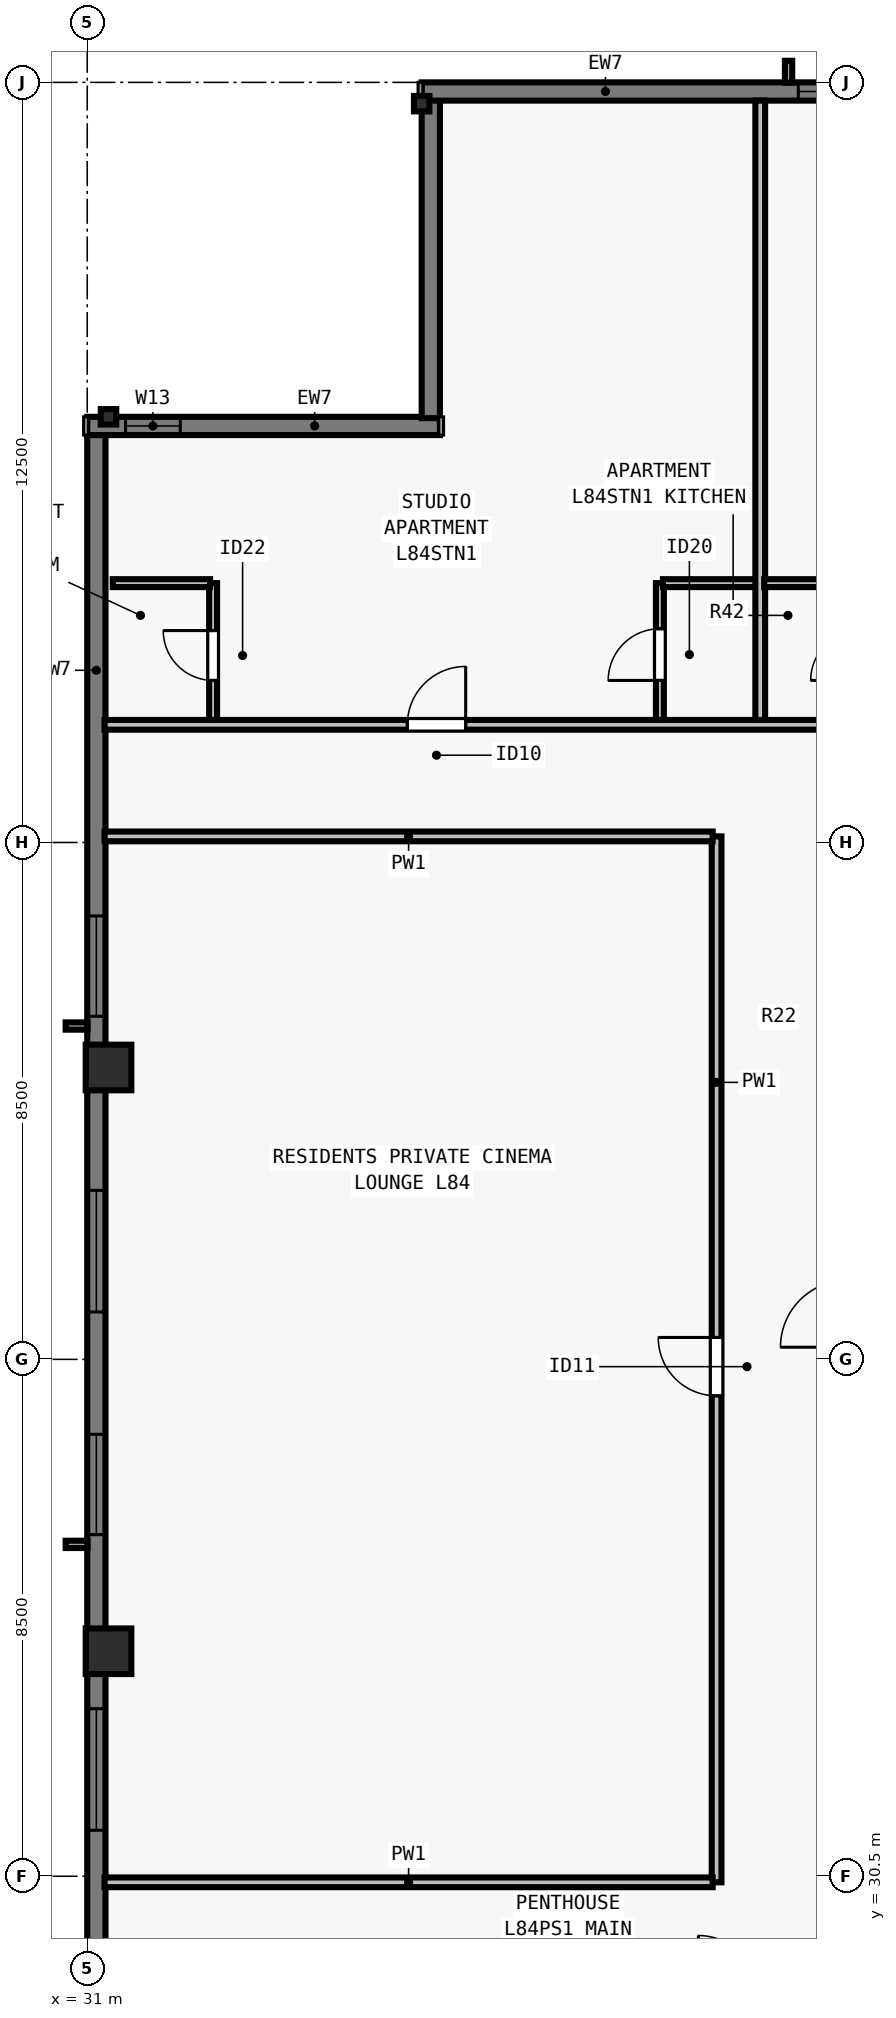
"""IFC4 building model, lengths in metres.
Left out: names, types, materials, properties, quantities, classifications, styles, units other than length and angle.
Written with IfcOpenShell. Run it as: python <this file> out.ifc"""

import sys

from ifc_helpers import new_model, si_unit, direction, frame, frame_2d, origin, origin_2d, place, context, subcontext, project, spatial, rectangle, i_section, extrude, element, fill, save


model = new_model("IFC4")
c1 = context("Model", 3, precision=1e-05, world=origin(), true_north=direction((0.0, 1.0)))
c2 = subcontext(c1, "Body", "Model", "MODEL_VIEW")
j1 = project(units=[si_unit("LENGTHUNIT", "METRE"), si_unit("PLANEANGLEUNIT", "RADIAN")], contexts=[c1])
p1 = place(None, origin())
s1 = spatial("IfcSite", under=j1, at=p1, CompositionType="ELEMENT")
p2 = place(p1, origin())
s2 = spatial("IfcBuilding", under=s1, at=p2, CompositionType="ELEMENT")
p3 = place(p2, frame((0.0, 0.0, 305.0)))
s3 = spatial("IfcBuildingStorey", under=s2, at=p3, CompositionType="ELEMENT", Elevation=305.0)
for number, where, z_axis, x_axis in (
    (1, (36.5, 59.65, 0.0), (0.0, 0.0, 1.0), (1.0, 0.0, 0.0)),
    (2, (31.35, 54.5, 0.0), (0.0, 0.0, 1.0), (0.0, 1.0, 0.0)),
):
    element("IfcColumn", number, at=place(p3, frame(where, z_axis=z_axis, x_axis=x_axis)), inside=s3, PredefinedType="COLUMN", context=c2, shape_type="SweptSolid", body=[
        extrude(i_section(OverallWidth=0.254, OverallDepth=0.254, WebThickness=0.009, FlangeThickness=0.014, FilletRadius=0.013, at=origin_2d()), origin(), (0.0, 0.0, 1.0), 3.5),
    ])
for number, where, z_axis, x_axis in (
    (3, (31.35, 43.8, 0.0), (0.0, 0.0, 1.0), (0.0, 1.0, 0.0)),
    (4, (31.35, 34.2, 0.0), (0.0, 0.0, 1.0), (0.0, 1.0, 0.0)),
):
    element("IfcColumn", number, at=place(p3, frame(where, z_axis=z_axis, x_axis=x_axis)), inside=s3, PredefinedType="COLUMN", context=c2, shape_type="SweptSolid", body=[
        extrude(rectangle(XDim=0.75, YDim=0.75, at=origin_2d()), origin(), (0.0, 0.0, 1.0), 3.5),
    ])
p4 = place(p3, frame((31.15, 23.5, 0.0), z_axis=(0.0, 0.0, 1.0), x_axis=(0.0, 1.0, 0.0)))
e5 = element("IfcWall", 5, at=p4, inside=s3, PredefinedType="SOLIDWALL", context=c2, shape_type="SweptSolid", body=[
    extrude(rectangle(XDim=30.722, YDim=0.3, at=frame_2d((15.361, 0.0))), origin(), (0.0, 0.0, 1.0), 3.29),
])
p5 = place(p4, frame((7.756, 0.0, 0.8)))
e6 = element("IfcOpeningElement", 6, at=p5, cuts=e5, PredefinedType="OPENING", context=c2, shape_type="SweptSolid", body=[
    extrude(rectangle(XDim=2.0, YDim=1.758, at=frame_2d((1.0, 0.879))), frame((0.0, 0.16, 0.0), z_axis=(0.0, -1.0, 0.0), x_axis=(1.0, 0.0, 0.0)), (0.0, 0.0, 1.0), 0.32),
])
p6 = place(p4, frame((12.617, 0.0, 0.8)))
e7 = element("IfcOpeningElement", 7, at=p6, cuts=e5, PredefinedType="OPENING", context=c2, shape_type="SweptSolid", body=[
    extrude(rectangle(XDim=1.65, YDim=1.758, at=frame_2d((0.825, 0.879))), frame((0.0, 0.16, 0.0), z_axis=(0.0, -1.0, 0.0), x_axis=(1.0, 0.0, 0.0)), (0.0, 0.0, 1.0), 0.32),
])
p7 = place(p4, frame((16.28, 0.0, 0.8)))
e8 = element("IfcOpeningElement", 8, at=p7, cuts=e5, PredefinedType="OPENING", context=c2, shape_type="SweptSolid", body=[
    extrude(rectangle(XDim=2.0, YDim=1.758, at=frame_2d((1.0, 0.879))), frame((0.0, 0.16, 0.0), z_axis=(0.0, -1.0, 0.0), x_axis=(1.0, 0.0, 0.0)), (0.0, 0.0, 1.0), 0.32),
])
p8 = place(p4, frame((21.142, 0.0, 0.8)))
e9 = element("IfcOpeningElement", 9, at=p8, cuts=e5, PredefinedType="OPENING", context=c2, shape_type="SweptSolid", body=[
    extrude(rectangle(XDim=1.65, YDim=1.758, at=frame_2d((0.825, 0.879))), frame((0.0, 0.16, 0.0), z_axis=(0.0, -1.0, 0.0), x_axis=(1.0, 0.0, 0.0)), (0.0, 0.0, 1.0), 0.32),
])
p9 = place(p3, frame((31.0, 54.35, 0.0), z_axis=(0.0, 0.0, 1.0), x_axis=(1.0, 0.0, 0.0)))
e10 = element("IfcWall", 10, at=p9, inside=s3, PredefinedType="SOLIDWALL", context=c2, shape_type="SweptSolid", body=[
    extrude(rectangle(XDim=5.8, YDim=0.3, at=frame_2d((2.9, 0.0))), origin(), (0.0, 0.0, 1.0), 3.29),
])
p10 = place(p9, frame((0.63, 0.0, 0.8)))
e11 = element("IfcOpeningElement", 11, at=p10, cuts=e10, PredefinedType="OPENING", context=c2, shape_type="SweptSolid", body=[
    extrude(rectangle(XDim=0.9, YDim=1.75, at=frame_2d((0.45, 0.875))), frame((0.0, 0.16, 0.0), z_axis=(0.0, -1.0, 0.0), x_axis=(1.0, 0.0, 0.0)), (0.0, 0.0, 1.0), 0.32),
])
p11 = place(p3, frame((36.65, 54.478, 0.0), z_axis=(0.0, 0.0, 1.0), x_axis=(0.0, 1.0, 0.0)))
e12 = element("IfcWall", 12, at=p11, inside=s3, PredefinedType="SOLIDWALL", context=c2, shape_type="SweptSolid", body=[
    extrude(rectangle(XDim=5.244, YDim=0.3, at=frame_2d((2.622, 0.0))), origin(), (0.0, 0.0, 1.0), 3.29),
])
p12 = place(p3, frame((36.5, 59.85, 0.0), z_axis=(0.0, 0.0, 1.0), x_axis=(1.0, 0.0, 0.0)))
e13 = element("IfcWall", 13, at=p12, inside=s3, PredefinedType="SOLIDWALL", context=c2, shape_type="SweptSolid", body=[
    extrude(rectangle(XDim=30.722, YDim=0.3, at=frame_2d((15.361, 0.0))), origin(), (0.0, 0.0, 1.0), 3.29),
])
p13 = place(p12, frame((6.194, 0.0, 0.8)))
e14 = element("IfcOpeningElement", 14, at=p13, cuts=e13, PredefinedType="OPENING", context=c2, shape_type="SweptSolid", body=[
    extrude(rectangle(XDim=1.65, YDim=1.758, at=frame_2d((0.825, 0.879))), frame((0.0, 0.16, 0.0), z_axis=(0.0, -1.0, 0.0), x_axis=(1.0, 0.0, 0.0)), (0.0, 0.0, 1.0), 0.32),
])
p14 = place(p12, frame((12.617, 0.0, 0.8)))
e15 = element("IfcOpeningElement", 15, at=p14, cuts=e13, PredefinedType="OPENING", context=c2, shape_type="SweptSolid", body=[
    extrude(rectangle(XDim=1.65, YDim=1.758, at=frame_2d((0.825, 0.879))), frame((0.0, 0.16, 0.0), z_axis=(0.0, -1.0, 0.0), x_axis=(1.0, 0.0, 0.0)), (0.0, 0.0, 1.0), 0.32),
])
p15 = place(p12, frame((16.28, 0.0, 0.8)))
e16 = element("IfcOpeningElement", 16, at=p15, cuts=e13, PredefinedType="OPENING", context=c2, shape_type="SweptSolid", body=[
    extrude(rectangle(XDim=2.0, YDim=1.758, at=frame_2d((1.0, 0.879))), frame((0.0, 0.16, 0.0), z_axis=(0.0, -1.0, 0.0), x_axis=(1.0, 0.0, 0.0)), (0.0, 0.0, 1.0), 0.32),
])
p16 = place(p12, frame((21.142, 0.0, 0.8)))
e17 = element("IfcOpeningElement", 17, at=p16, cuts=e13, PredefinedType="OPENING", context=c2, shape_type="SweptSolid", body=[
    extrude(rectangle(XDim=1.65, YDim=1.758, at=frame_2d((0.825, 0.879))), frame((0.0, 0.16, 0.0), z_axis=(0.0, -1.0, 0.0), x_axis=(1.0, 0.0, 0.0)), (0.0, 0.0, 1.0), 0.32),
])
p17 = place(p12, frame((23.503, 0.0, 0.8)))
e18 = element("IfcOpeningElement", 18, at=p17, cuts=e13, PredefinedType="OPENING", context=c2, shape_type="SweptSolid", body=[
    extrude(rectangle(XDim=2.0, YDim=1.758, at=frame_2d((1.0, 0.879))), frame((0.0, 0.16, 0.0), z_axis=(0.0, -1.0, 0.0), x_axis=(1.0, 0.0, 0.0)), (0.0, 0.0, 1.0), 0.32),
])
p18 = place(p12, frame((26.55, 0.0, 0.8)))
e19 = element("IfcOpeningElement", 19, at=p18, cuts=e13, PredefinedType="OPENING", context=c2, shape_type="SweptSolid", body=[
    extrude(rectangle(XDim=0.9, YDim=1.75, at=frame_2d((0.45, 0.875))), frame((0.0, 0.16, 0.0), z_axis=(0.0, -1.0, 0.0), x_axis=(1.0, 0.0, 0.0)), (0.0, 0.0, 1.0), 0.32),
])
p19 = place(p3, frame((31.285, 49.435, 0.0), z_axis=(0.0, 0.0, 1.0), x_axis=(1.0, 0.0, 0.0)))
e20 = element("IfcWall", 20, at=p19, inside=s3, PredefinedType="PARTITIONING", context=c2, shape_type="SweptSolid", body=[
    extrude(rectangle(XDim=41.43, YDim=0.16, at=frame_2d((20.715, 0.0))), origin(), (0.0, 0.0, 1.0), 3.009),
])
p20 = place(p19, frame((4.979, 0.0, 0.0)))
e21 = element("IfcOpeningElement", 21, at=p20, cuts=e20, PredefinedType="OPENING", context=c2, shape_type="SweptSolid", body=[
    extrude(rectangle(XDim=0.96, YDim=2.18, at=frame_2d((0.48, 1.09))), frame((0.0, 0.09, 0.0), z_axis=(0.0, -1.0, 0.0), x_axis=(1.0, 0.0, 0.0)), (0.0, 0.0, 1.0), 0.18),
])
p21 = place(p19, frame((15.145, 0.0, 0.0)))
e22 = element("IfcOpeningElement", 22, at=p21, cuts=e20, PredefinedType="OPENING", context=c2, shape_type="SweptSolid", body=[
    extrude(rectangle(XDim=0.96, YDim=2.18, at=frame_2d((0.48, 1.09))), frame((0.0, 0.09, 0.0), z_axis=(0.0, -1.0, 0.0), x_axis=(1.0, 0.0, 0.0)), (0.0, 0.0, 1.0), 0.18),
])
p22 = place(p19, frame((25.435, 0.0, 0.0)))
e23 = element("IfcOpeningElement", 23, at=p22, cuts=e20, PredefinedType="OPENING", context=c2, shape_type="SweptSolid", body=[
    extrude(rectangle(XDim=0.96, YDim=2.18, at=frame_2d((0.48, 1.09))), frame((0.0, 0.09, 0.0), z_axis=(0.0, -1.0, 0.0), x_axis=(1.0, 0.0, 0.0)), (0.0, 0.0, 1.0), 0.18),
])
p23 = place(p19, frame((35.849, 0.0, 0.0)))
e24 = element("IfcOpeningElement", 24, at=p23, cuts=e20, PredefinedType="OPENING", context=c2, shape_type="SweptSolid", body=[
    extrude(rectangle(XDim=0.96, YDim=2.18, at=frame_2d((0.48, 1.09))), frame((0.0, 0.09, 0.0), z_axis=(0.0, -1.0, 0.0), x_axis=(1.0, 0.0, 0.0)), (0.0, 0.0, 1.0), 0.18),
])
p24 = place(p3, frame((41.35, 30.4, 0.0), z_axis=(0.0, 0.0, 1.0), x_axis=(0.0, 1.0, 0.0)))
e25 = element("IfcWall", 25, at=p24, inside=s3, PredefinedType="PARTITIONING", context=c2, shape_type="SweptSolid", body=[
    extrude(rectangle(XDim=17.2, YDim=0.16, at=frame_2d((8.6, 0.0))), origin(), (0.0, 0.0, 1.0), 3.009),
])
p25 = place(p24, frame((8.0, 0.0, 0.0)))
e26 = element("IfcOpeningElement", 26, at=p25, cuts=e25, PredefinedType="OPENING", context=c2, shape_type="SweptSolid", body=[
    extrude(rectangle(XDim=0.96, YDim=2.12, at=frame_2d((0.48, 1.06))), frame((0.0, 0.09, 0.0), z_axis=(0.0, -1.0, 0.0), x_axis=(1.0, 0.0, 0.0)), (0.0, 0.0, 1.0), 0.18),
])
for number, where, z_axis, x_axis in (
    (27, (31.285, 30.4, 0.0), (0.0, 0.0, 1.0), (1.0, 0.0, 0.0)),
    (28, (31.285, 47.6, 0.0), (0.0, 0.0, 1.0), (1.0, 0.0, 0.0)),
):
    element("IfcWall", number, at=place(p3, frame(where, z_axis=z_axis, x_axis=x_axis)), inside=s3, PredefinedType="PARTITIONING", context=c2, shape_type="SweptSolid", body=[
        extrude(rectangle(XDim=10.0, YDim=0.16, at=frame_2d((5.0, 0.0))), origin(), (0.0, 0.0, 1.0), 3.29),
    ])
p26 = place(p3, frame((33.07, 49.515, 0.0), z_axis=(0.0, 0.0, 1.0), x_axis=(0.0, 1.0, 0.0)))
e29 = element("IfcWall", 29, at=p26, inside=s3, PredefinedType="PLUMBINGWALL", context=c2, shape_type="SweptSolid", body=[
    extrude(rectangle(XDim=2.25, YDim=0.13, at=frame_2d((1.125, 0.0))), origin(), (0.0, 0.0, 1.0), 3.29),
])
p27 = place(p26, frame((0.65, 0.0, 0.0)))
e30 = element("IfcOpeningElement", 30, at=p27, cuts=e29, PredefinedType="OPENING", context=c2, shape_type="SweptSolid", body=[
    extrude(rectangle(XDim=0.82, YDim=2.1, at=frame_2d((0.41, 1.05))), frame((0.0, 0.075, 0.0), z_axis=(0.0, -1.0, 0.0), x_axis=(1.0, 0.0, 0.0)), (0.0, 0.0, 1.0), 0.15),
])
p28 = place(p3, frame((31.42, 51.765, 0.0), z_axis=(0.0, 0.0, 1.0), x_axis=(1.0, 0.0, 0.0)))
e31 = element("IfcWall", 31, at=p28, inside=s3, PredefinedType="PLUMBINGWALL", context=c2, shape_type="SweptSolid", body=[
    extrude(rectangle(XDim=1.6, YDim=0.13, at=frame_2d((0.8, 0.0))), origin(), (0.0, 0.0, 1.0), 3.29),
])
p29 = place(p3, frame((40.417, 49.515, 0.0), z_axis=(0.0, 0.0, 1.0), x_axis=(0.0, 1.0, 0.0)))
e32 = element("IfcWall", 32, at=p29, inside=s3, PredefinedType="PLUMBINGWALL", context=c2, shape_type="SweptSolid", body=[
    extrude(rectangle(XDim=2.25, YDim=0.13, at=frame_2d((1.125, 0.0))), origin(), (0.0, 0.0, 1.0), 3.29),
])
p30 = place(p29, frame((0.65, 0.0, 0.0)))
e33 = element("IfcOpeningElement", 33, at=p30, cuts=e32, PredefinedType="OPENING", context=c2, shape_type="SweptSolid", body=[
    extrude(rectangle(XDim=0.85, YDim=2.1, at=frame_2d((0.425, 1.05))), frame((0.0, 0.075, 0.0), z_axis=(0.0, -1.0, 0.0), x_axis=(1.0, 0.0, 0.0)), (0.0, 0.0, 1.0), 0.15),
])
p31 = place(p3, frame((40.468, 51.765, 0.0), z_axis=(0.0, 0.0, 1.0), x_axis=(1.0, 0.0, 0.0)))
e34 = element("IfcWall", 34, at=p31, inside=s3, PredefinedType="PLUMBINGWALL", context=c2, shape_type="SweptSolid", body=[
    extrude(rectangle(XDim=1.6, YDim=0.13, at=frame_2d((0.8, 0.0))), origin(), (0.0, 0.0, 1.0), 3.29),
])
p32 = place(p3, frame((42.067, 49.515, 0.0), z_axis=(0.0, 0.0, 1.0), x_axis=(0.0, 1.0, 0.0)))
e35 = element("IfcWall", 35, at=p32, inside=s3, PredefinedType="PARTITIONING", context=c2, shape_type="SweptSolid", body=[
    extrude(rectangle(XDim=10.185, YDim=0.16, at=frame_2d((5.093, 0.0))), origin(), (0.0, 0.0, 1.0), 2.653),
])
p33 = place(p3, frame((42.133, 51.765, 0.0), z_axis=(0.0, 0.0, 1.0), x_axis=(1.0, 0.0, 0.0)))
e36 = element("IfcWall", 36, at=p33, inside=s3, PredefinedType="PLUMBINGWALL", context=c2, shape_type="SweptSolid", body=[
    extrude(rectangle(XDim=1.535, YDim=0.13, at=frame_2d((0.768, 0.0))), origin(), (0.0, 0.0, 1.0), 3.29),
])
p34 = place(p5, origin())
e37 = element("IfcWindow", 37, at=p34, inside=s3, PartitioningType="SINGLE_PANEL", PredefinedType="WINDOW", context=c2, shape_type="SweptSolid", body=[
    extrude(rectangle(XDim=2.0, YDim=1.758, at=frame_2d((1.0, 0.879))), frame((0.0, -0.05, 0.0), z_axis=(0.0, -1.0, 0.0), x_axis=(1.0, 0.0, 0.0)), (0.0, 0.0, 1.0), 0.06),
])
fill(e6, e37)
p35 = place(p6, origin())
e38 = element("IfcWindow", 38, at=p35, inside=s3, PartitioningType="SINGLE_PANEL", PredefinedType="WINDOW", context=c2, shape_type="SweptSolid", body=[
    extrude(rectangle(XDim=1.65, YDim=1.758, at=frame_2d((0.825, 0.879))), frame((0.0, -0.05, 0.0), z_axis=(0.0, -1.0, 0.0), x_axis=(1.0, 0.0, 0.0)), (0.0, 0.0, 1.0), 0.06),
])
fill(e7, e38)
p36 = place(p7, origin())
e39 = element("IfcWindow", 39, at=p36, inside=s3, PartitioningType="SINGLE_PANEL", PredefinedType="WINDOW", context=c2, shape_type="SweptSolid", body=[
    extrude(rectangle(XDim=2.0, YDim=1.758, at=frame_2d((1.0, 0.879))), frame((0.0, -0.05, 0.0), z_axis=(0.0, -1.0, 0.0), x_axis=(1.0, 0.0, 0.0)), (0.0, 0.0, 1.0), 0.06),
])
fill(e8, e39)
p37 = place(p8, origin())
e40 = element("IfcWindow", 40, at=p37, inside=s3, PartitioningType="SINGLE_PANEL", PredefinedType="WINDOW", context=c2, shape_type="SweptSolid", body=[
    extrude(rectangle(XDim=1.65, YDim=1.758, at=frame_2d((0.825, 0.879))), frame((0.0, -0.05, 0.0), z_axis=(0.0, -1.0, 0.0), x_axis=(1.0, 0.0, 0.0)), (0.0, 0.0, 1.0), 0.06),
])
fill(e9, e40)
p38 = place(p13, origin())
e41 = element("IfcWindow", 41, at=p38, inside=s3, PartitioningType="SINGLE_PANEL", PredefinedType="WINDOW", context=c2, shape_type="SweptSolid", body=[
    extrude(rectangle(XDim=1.65, YDim=1.758, at=frame_2d((0.825, 0.879))), frame((0.0, -0.05, 0.0), z_axis=(0.0, -1.0, 0.0), x_axis=(1.0, 0.0, 0.0)), (0.0, 0.0, 1.0), 0.06),
])
fill(e14, e41)
p39 = place(p10, origin())
e42 = element("IfcWindow", 42, at=p39, inside=s3, PartitioningType="SINGLE_PANEL", PredefinedType="WINDOW", context=c2, shape_type="SweptSolid", body=[
    extrude(rectangle(XDim=0.9, YDim=1.75, at=frame_2d((0.45, 0.875))), frame((0.0, -0.04, 0.0), z_axis=(0.0, -1.0, 0.0), x_axis=(1.0, 0.0, 0.0)), (0.0, 0.0, 1.0), 0.06),
])
fill(e11, e42)
p40 = place(p27, origin())
e43 = element("IfcDoor", 43, at=p40, inside=s3, OperationType="SINGLE_SWING_RIGHT", PredefinedType="DOOR", context=c2, shape_type="SweptSolid", body=[
    extrude(rectangle(XDim=0.82, YDim=2.1, at=frame_2d((0.41, 1.05))), frame((0.0, 0.025, 0.0), z_axis=(0.0, -1.0, 0.0), x_axis=(1.0, 0.0, 0.0)), (0.0, 0.0, 1.0), 0.05),
])
fill(e30, e43)
p41 = place(p30, origin())
e44 = element("IfcDoor", 44, at=p41, inside=s3, OperationType="SINGLE_SWING_LEFT", PredefinedType="DOOR", context=c2, shape_type="SweptSolid", body=[
    extrude(rectangle(XDim=0.85, YDim=2.1, at=frame_2d((0.425, 1.05))), frame((0.0, 0.025, 0.0), z_axis=(0.0, -1.0, 0.0), x_axis=(1.0, 0.0, 0.0)), (0.0, 0.0, 1.0), 0.05),
])
fill(e33, e44)
p42 = place(p20, origin())
e45 = element("IfcDoor", 45, at=p42, inside=s3, OperationType="SINGLE_SWING_RIGHT", PredefinedType="DOOR", context=c2, shape_type="SweptSolid", body=[
    extrude(rectangle(XDim=0.96, YDim=2.18, at=frame_2d((0.48, 1.09))), frame((0.0, 0.025, 0.0), z_axis=(0.0, -1.0, 0.0), x_axis=(1.0, 0.0, 0.0)), (0.0, 0.0, 1.0), 0.05),
])
fill(e21, e45)
p43 = place(p25, origin())
e46 = element("IfcDoor", 46, at=p43, inside=s3, OperationType="SINGLE_SWING_RIGHT", PredefinedType="DOOR", context=c2, shape_type="SweptSolid", body=[
    extrude(rectangle(XDim=0.96, YDim=2.12, at=frame_2d((0.48, 1.06))), frame((0.0, 0.025, 0.0), z_axis=(0.0, -1.0, 0.0), x_axis=(1.0, 0.0, 0.0)), (0.0, 0.0, 1.0), 0.05),
])
fill(e26, e46)
save(model, sys.argv[1])
